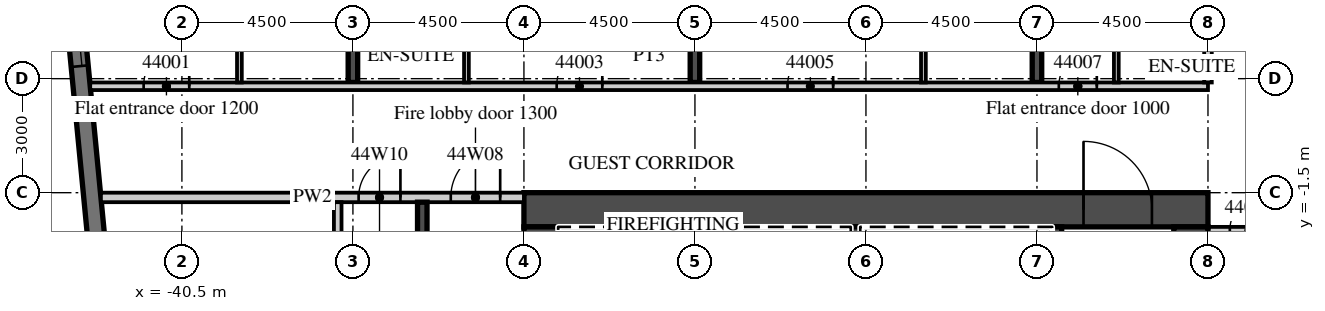
"""IFC4 building model, lengths in metres.
Left out: names, types, materials, properties, quantities, classifications, styles, units other than length and angle.
Written with IfcOpenShell. Run it as: python <this file> out.ifc"""

import sys

from ifc_helpers import new_model, si_unit, direction, frame, frame_2d, origin, place, context, subcontext, project, spatial, rectangle, extrude, element, fill, save


model = new_model("IFC4")
c1 = context("Model", 3, precision=1e-05, world=origin(), true_north=direction((0.0, 1.0)))
c2 = subcontext(c1, "Body", "Model", "MODEL_VIEW")
j1 = project(units=[si_unit("LENGTHUNIT", "METRE"), si_unit("PLANEANGLEUNIT", "RADIAN")], contexts=[c1])
p1 = place(None, origin())
s1 = spatial("IfcSite", under=j1, at=p1, CompositionType="ELEMENT")
p2 = place(p1, origin())
s2 = spatial("IfcBuilding", under=s1, at=p2, CompositionType="ELEMENT")
p3 = place(p2, frame((0.0, 0.0, 186.7)))
s3 = spatial("IfcBuildingStorey", under=s2, at=p3, CompositionType="ELEMENT", Elevation=186.7)
p4 = place(p3, frame((-36.0, 1.4, 0.0), z_axis=(0.0, 0.0, 1.0), x_axis=(0.0, 1.0, 0.0)))
e1 = element("IfcWall", 1, at=p4, inside=s3, PredefinedType="SHEAR", context=c2, shape_type="SweptSolid", body=[
    extrude(rectangle(XDim=15.401, YDim=0.25, at=frame_2d((7.701, 0.0))), origin(), (0.0, 0.0, 1.0), 3.3),
])
p5 = place(p3, frame((-27.0, 1.4, 0.0), z_axis=(0.0, 0.0, 1.0), x_axis=(0.0, 1.0, 0.0)))
e2 = element("IfcWall", 2, at=p5, inside=s3, PredefinedType="SHEAR", context=c2, shape_type="SweptSolid", body=[
    extrude(rectangle(XDim=16.268, YDim=0.25, at=frame_2d((8.134, 0.0))), origin(), (0.0, 0.0, 1.0), 3.3),
])
p6 = place(p3, frame((-18.0, 1.4, 0.0), z_axis=(0.0, 0.0, 1.0), x_axis=(0.0, 1.0, 0.0)))
e3 = element("IfcWall", 3, at=p6, inside=s3, PredefinedType="SHEAR", context=c2, shape_type="SweptSolid", body=[
    extrude(rectangle(XDim=17.134, YDim=0.25, at=frame_2d((8.567, 0.0))), origin(), (0.0, 0.0, 1.0), 3.3),
])
p7 = place(p3, frame((-44.214, 12.466, 0.0), z_axis=(0.0, 0.0, 1.0), x_axis=(0.095847314626, -0.995396047952, 0.0)))
e4 = element("IfcWall", 4, at=p7, inside=s3, PredefinedType="SOLIDWALL", context=c2, shape_type="SweptSolid", body=[
    extrude(rectangle(XDim=34.0, YDim=0.45, at=frame_2d((17.0, 0.0))), origin(), (0.0, 0.0, 1.0), 3.02),
])
p8 = place(p7, frame((2.865, 0.0, 0.45)))
e5 = element("IfcOpeningElement", 5, at=p8, cuts=e4, PredefinedType="OPENING", context=c2, shape_type="SweptSolid", body=[
    extrude(rectangle(XDim=3.3, YDim=2.25, at=frame_2d((1.65, 1.125))), frame((0.0, 0.235, 0.0), z_axis=(0.0, -1.0, 0.0), x_axis=(1.0, 0.0, 0.0)), (0.0, 0.0, 1.0), 0.47),
])
p9 = place(p7, frame((7.386, 0.0, 0.45)))
e6 = element("IfcOpeningElement", 6, at=p9, cuts=e4, PredefinedType="OPENING", context=c2, shape_type="SweptSolid", body=[
    extrude(rectangle(XDim=3.3, YDim=2.25, at=frame_2d((1.65, 1.125))), frame((0.0, 0.235, 0.0), z_axis=(0.0, -1.0, 0.0), x_axis=(1.0, 0.0, 0.0)), (0.0, 0.0, 1.0), 0.47),
])
p10 = place(p3, frame((-42.913, 1.3, 0.0), z_axis=(0.0, 0.0, 1.0), x_axis=(1.0, 0.0, 0.0)))
e7 = element("IfcWall", 7, at=p10, inside=s3, PredefinedType="PARTITIONING", context=c2, shape_type="SweptSolid", body=[
    extrude(rectangle(XDim=29.413, YDim=0.2, at=frame_2d((14.707, 0.0))), origin(), (0.0, 0.0, 1.0), 3.02),
])
p11 = place(p10, frame((1.406, 0.0, 0.0)))
e8 = element("IfcOpeningElement", 8, at=p11, cuts=e7, PredefinedType="OPENING", context=c2, shape_type="SweptSolid", body=[
    extrude(rectangle(XDim=1.2, YDim=2.1, at=frame_2d((0.6, 1.05))), frame((0.0, 0.11, 0.0), z_axis=(0.0, -1.0, 0.0), x_axis=(1.0, 0.0, 0.0)), (0.0, 0.0, 1.0), 0.22),
])
p12 = place(p10, frame((12.275, 0.0, 0.0)))
e9 = element("IfcOpeningElement", 9, at=p12, cuts=e7, PredefinedType="OPENING", context=c2, shape_type="SweptSolid", body=[
    extrude(rectangle(XDim=1.2, YDim=2.1, at=frame_2d((0.6, 1.05))), frame((0.0, 0.11, 0.0), z_axis=(0.0, -1.0, 0.0), x_axis=(1.0, 0.0, 0.0)), (0.0, 0.0, 1.0), 0.22),
])
p13 = place(p10, frame((18.35, 0.0, 0.0)))
e10 = element("IfcOpeningElement", 10, at=p13, cuts=e7, PredefinedType="OPENING", context=c2, shape_type="SweptSolid", body=[
    extrude(rectangle(XDim=1.2, YDim=2.1, at=frame_2d((0.6, 1.05))), frame((0.0, 0.11, 0.0), z_axis=(0.0, -1.0, 0.0), x_axis=(1.0, 0.0, 0.0)), (0.0, 0.0, 1.0), 0.22),
])
p14 = place(p10, frame((25.488, 0.0, 0.0)))
e11 = element("IfcOpeningElement", 11, at=p14, cuts=e7, PredefinedType="OPENING", context=c2, shape_type="SweptSolid", body=[
    extrude(rectangle(XDim=1.0, YDim=2.1, at=frame_2d((0.5, 1.05))), frame((0.0, 0.11, 0.0), z_axis=(0.0, -1.0, 0.0), x_axis=(1.0, 0.0, 0.0)), (0.0, 0.0, 1.0), 0.22),
])
p15 = place(p3, frame((-38.987, 1.4, 0.0), z_axis=(0.0, 0.0, 1.0), x_axis=(0.0, 1.0, 0.0)))
e12 = element("IfcWall", 12, at=p15, inside=s3, PredefinedType="PARTITIONING", context=c2, shape_type="SweptSolid", body=[
    extrude(rectangle(XDim=3.725, YDim=0.125, at=frame_2d((1.863, 0.0))), origin(), (0.0, 0.0, 1.0), 3.02),
])
p16 = place(p15, frame((2.45, 0.0, 0.0)))
e13 = element("IfcOpeningElement", 13, at=p16, cuts=e12, PredefinedType="OPENING", context=c2, shape_type="SweptSolid", body=[
    extrude(rectangle(XDim=0.9, YDim=2.1, at=frame_2d((0.45, 1.05))), frame((0.0, 0.073, 0.0), z_axis=(0.0, -1.0, 0.0), x_axis=(1.0, 0.0, 0.0)), (0.0, 0.0, 1.0), 0.145),
])
p17 = place(p3, frame((-33.013, 1.4, 0.0), z_axis=(0.0, 0.0, 1.0), x_axis=(0.0, 1.0, 0.0)))
e14 = element("IfcWall", 14, at=p17, inside=s3, PredefinedType="PARTITIONING", context=c2, shape_type="SweptSolid", body=[
    extrude(rectangle(XDim=3.725, YDim=0.125, at=frame_2d((1.863, 0.0))), origin(), (0.0, 0.0, 1.0), 3.02),
])
p18 = place(p17, frame((2.45, 0.0, 0.0)))
e15 = element("IfcOpeningElement", 15, at=p18, cuts=e14, PredefinedType="OPENING", context=c2, shape_type="SweptSolid", body=[
    extrude(rectangle(XDim=0.9, YDim=2.1, at=frame_2d((0.45, 1.05))), frame((0.0, 0.073, 0.0), z_axis=(0.0, -1.0, 0.0), x_axis=(1.0, 0.0, 0.0)), (0.0, 0.0, 1.0), 0.145),
])
p19 = place(p3, frame((-20.988, 1.4, 0.0), z_axis=(0.0, 0.0, 1.0), x_axis=(0.0, 1.0, 0.0)))
e16 = element("IfcWall", 16, at=p19, inside=s3, PredefinedType="PARTITIONING", context=c2, shape_type="SweptSolid", body=[
    extrude(rectangle(XDim=3.725, YDim=0.125, at=frame_2d((1.863, 0.0))), origin(), (0.0, 0.0, 1.0), 3.02),
])
p20 = place(p19, frame((2.45, 0.0, 0.0)))
e17 = element("IfcOpeningElement", 17, at=p20, cuts=e16, PredefinedType="OPENING", context=c2, shape_type="SweptSolid", body=[
    extrude(rectangle(XDim=0.9, YDim=2.1, at=frame_2d((0.45, 1.05))), frame((0.0, 0.073, 0.0), z_axis=(0.0, -1.0, 0.0), x_axis=(1.0, 0.0, 0.0)), (0.0, 0.0, 1.0), 0.145),
])
p21 = place(p3, frame((-13.5, 1.4, 0.0), z_axis=(0.0, 0.0, 1.0), x_axis=(0.0, 1.0, 0.0)))
e18 = element("IfcWall", 18, at=p21, inside=s3, PredefinedType="PARTITIONING", context=c2, shape_type="SweptSolid", body=[
    extrude(rectangle(XDim=17.59, YDim=0.2, at=frame_2d((8.795, 0.0))), origin(), (0.0, 0.0, 1.0), 3.02),
])
p22 = place(p3, frame((-15.912, 1.4, 0.0), z_axis=(0.0, 0.0, 1.0), x_axis=(0.0, 1.0, 0.0)))
e19 = element("IfcWall", 19, at=p22, inside=s3, PredefinedType="PARTITIONING", context=c2, shape_type="SweptSolid", body=[
    extrude(rectangle(XDim=3.725, YDim=0.125, at=frame_2d((1.863, 0.0))), origin(), (0.0, 0.0, 1.0), 3.02),
])
p23 = place(p22, frame((2.45, 0.0, 0.0)))
e20 = element("IfcOpeningElement", 20, at=p23, cuts=e19, PredefinedType="OPENING", context=c2, shape_type="SweptSolid", body=[
    extrude(rectangle(XDim=0.9, YDim=2.1, at=frame_2d((0.45, 1.05))), frame((0.0, 0.073, 0.0), z_axis=(0.0, -1.0, 0.0), x_axis=(1.0, 0.0, 0.0)), (0.0, 0.0, 1.0), 0.145),
])
p24 = place(p3, frame((-13.5, -2.5, 0.0), z_axis=(0.0, 0.0, 1.0), x_axis=(1.0, 0.0, 0.0)))
e21 = element("IfcWall", 21, at=p24, inside=s3, PredefinedType="PARTITIONING", context=c2, shape_type="SweptSolid", body=[
    extrude(rectangle(XDim=27.0, YDim=0.2, at=frame_2d((13.5, 0.0))), origin(), (0.0, 0.0, 1.0), 3.02),
])
p25 = place(p24, frame((0.575, 0.0, 0.0)))
e22 = element("IfcOpeningElement", 22, at=p25, cuts=e21, PredefinedType="OPENING", context=c2, shape_type="SweptSolid", body=[
    extrude(rectangle(XDim=1.0, YDim=2.1, at=frame_2d((0.5, 1.05))), frame((0.0, 0.11, 0.0), z_axis=(0.0, -1.0, 0.0), x_axis=(1.0, 0.0, 0.0)), (0.0, 0.0, 1.0), 0.22),
])
p26 = place(p24, frame((7.45, 0.0, 0.0)))
e23 = element("IfcOpeningElement", 23, at=p26, cuts=e21, PredefinedType="OPENING", context=c2, shape_type="SweptSolid", body=[
    extrude(rectangle(XDim=1.0, YDim=2.1, at=frame_2d((0.5, 1.05))), frame((0.0, 0.11, 0.0), z_axis=(0.0, -1.0, 0.0), x_axis=(1.0, 0.0, 0.0)), (0.0, 0.0, 1.0), 0.22),
])
p27 = place(p24, frame((9.55, 0.0, 0.0)))
e24 = element("IfcOpeningElement", 24, at=p27, cuts=e21, PredefinedType="OPENING", context=c2, shape_type="SweptSolid", body=[
    extrude(rectangle(XDim=1.0, YDim=2.1, at=frame_2d((0.5, 1.05))), frame((0.0, 0.11, 0.0), z_axis=(0.0, -1.0, 0.0), x_axis=(1.0, 0.0, 0.0)), (0.0, 0.0, 1.0), 0.22),
])
p28 = place(p24, frame((18.862, 0.0, 0.0)))
e25 = element("IfcOpeningElement", 25, at=p28, cuts=e21, PredefinedType="OPENING", context=c2, shape_type="SweptSolid", body=[
    extrude(rectangle(XDim=1.2, YDim=2.1, at=frame_2d((0.6, 1.05))), frame((0.0, 0.11, 0.0), z_axis=(0.0, -1.0, 0.0), x_axis=(1.0, 0.0, 0.0)), (0.0, 0.0, 1.0), 0.22),
])
p29 = place(p24, frame((23.075, 0.0, 0.0)))
e26 = element("IfcOpeningElement", 26, at=p29, cuts=e21, PredefinedType="OPENING", context=c2, shape_type="SweptSolid", body=[
    extrude(rectangle(XDim=1.0, YDim=2.1, at=frame_2d((0.5, 1.05))), frame((0.0, 0.11, 0.0), z_axis=(0.0, -1.0, 0.0), x_axis=(1.0, 0.0, 0.0)), (0.0, 0.0, 1.0), 0.22),
])
p30 = place(p3, frame((-31.5, -1.95, 0.0), z_axis=(0.0, 0.0, 1.0), x_axis=(1.0, 0.0, 0.0)))
e27 = element("IfcWall", 27, at=p30, inside=s3, PredefinedType="SHEAR", context=c2, shape_type="SweptSolid", body=[
    extrude(rectangle(XDim=18.0, YDim=0.9, at=frame_2d((9.0, 0.0))), origin(), (0.0, 0.0, 1.0), 3.02),
])
p31 = place(p30, frame((14.725, 0.0, 0.0)))
e28 = element("IfcOpeningElement", 28, at=p31, cuts=e27, PredefinedType="OPENING", context=c2, shape_type="SweptSolid", body=[
    extrude(rectangle(XDim=1.8, YDim=2.1, at=frame_2d((0.9, 1.05))), frame((0.0, 0.46, 0.0), z_axis=(0.0, -1.0, 0.0), x_axis=(1.0, 0.0, 0.0)), (0.0, 0.0, 1.0), 0.92),
])
p32 = place(p3, frame((-31.05, -15.2, 0.0), z_axis=(0.0, 0.0, 1.0), x_axis=(0.0, 1.0, 0.0)))
e29 = element("IfcWall", 29, at=p32, inside=s3, PredefinedType="SHEAR", context=c2, shape_type="SweptSolid", body=[
    extrude(rectangle(XDim=12.8, YDim=0.9, at=frame_2d((6.4, 0.0))), origin(), (0.0, 0.0, 1.0), 3.02),
])
p33 = place(p32, frame((11.5, 0.0, 0.0)))
e30 = element("IfcOpeningElement", 30, at=p33, cuts=e29, PredefinedType="OPENING", context=c2, shape_type="SweptSolid", body=[
    extrude(rectangle(XDim=1.1, YDim=2.1, at=frame_2d((0.55, 1.05))), frame((0.0, 0.46, 0.0), z_axis=(0.0, -1.0, 0.0), x_axis=(1.0, 0.0, 0.0)), (0.0, 0.0, 1.0), 0.92),
])
p34 = place(p3, frame((-13.95, -14.6, 0.0), z_axis=(0.0, 0.0, 1.0), x_axis=(0.0, 1.0, 0.0)))
e31 = element("IfcWall", 31, at=p34, inside=s3, PredefinedType="SHEAR", context=c2, shape_type="SweptSolid", body=[
    extrude(rectangle(XDim=12.2, YDim=0.9, at=frame_2d((6.1, 0.0))), origin(), (0.0, 0.0, 1.0), 3.02),
])
p35 = place(p3, frame((-17.475, -5.55, 0.0), z_axis=(0.0, 0.0, 1.0), x_axis=(0.0, 1.0, 0.0)))
e32 = element("IfcWall", 32, at=p35, inside=s3, PredefinedType="SHEAR", context=c2, shape_type="SweptSolid", body=[
    extrude(rectangle(XDim=3.15, YDim=0.25, at=frame_2d((1.575, 0.0))), origin(), (0.0, 0.0, 1.0), 3.02),
])
for number, where, z_axis, x_axis in (
    (33, (-27.975, -5.3, 0.0), (0.0, 0.0, 1.0), (0.0, 1.0, 0.0)),
    (34, (-22.775, -5.3, 0.0), (0.0, 0.0, 1.0), (0.0, 1.0, 0.0)),
):
    element("IfcWall", number, at=place(p3, frame(where, z_axis=z_axis, x_axis=x_axis)), inside=s3, PredefinedType="SHEAR", context=c2, shape_type="SweptSolid", body=[
        extrude(rectangle(XDim=2.9, YDim=0.25, at=frame_2d((1.45, 0.0))), origin(), (0.0, 0.0, 1.0), 3.02),
    ])
p36 = place(p3, frame((-42.632, -1.625, 0.0), z_axis=(0.0, 0.0, 1.0), x_axis=(1.0, 0.0, 0.0)))
e35 = element("IfcWall", 35, at=p36, inside=s3, PredefinedType="PARTITIONING", context=c2, shape_type="SweptSolid", body=[
    extrude(rectangle(XDim=11.132, YDim=0.25, at=frame_2d((5.566, 0.0))), origin(), (0.0, 0.0, 1.0), 3.02),
])
p37 = place(p36, frame((9.207, 0.0, 0.0)))
e36 = element("IfcOpeningElement", 36, at=p37, cuts=e35, PredefinedType="OPENING", context=c2, shape_type="SweptSolid", body=[
    extrude(rectangle(XDim=1.3, YDim=2.1, at=frame_2d((0.65, 1.05))), frame((0.0, 0.135, 0.0), z_axis=(0.0, -1.0, 0.0), x_axis=(1.0, 0.0, 0.0)), (0.0, 0.0, 1.0), 0.27),
])
p38 = place(p36, frame((6.781, 0.0, 0.0)))
e37 = element("IfcOpeningElement", 37, at=p38, cuts=e35, PredefinedType="OPENING", context=c2, shape_type="SweptSolid", body=[
    extrude(rectangle(XDim=1.1, YDim=2.1, at=frame_2d((0.55, 1.05))), frame((0.0, 0.135, 0.0), z_axis=(0.0, -1.0, 0.0), x_axis=(1.0, 0.0, 0.0)), (0.0, 0.0, 1.0), 0.27),
])
p39 = place(p3, frame((-34.175, -10.1, 0.0), z_axis=(0.0, 0.0, 1.0), x_axis=(0.0, 1.0, 0.0)))
e38 = element("IfcWall", 38, at=p39, inside=s3, PredefinedType="SHEAR", context=c2, shape_type="SweptSolid", body=[
    extrude(rectangle(XDim=8.35, YDim=0.25, at=frame_2d((4.175, 0.0))), origin(), (0.0, 0.0, 1.0), 3.02),
])
p40 = place(p3, frame((-36.4, -17.7, 0.0), z_axis=(0.0, 0.0, 1.0), x_axis=(0.0, 1.0, 0.0)))
e39 = element("IfcWall", 39, at=p40, inside=s3, PredefinedType="PARTITIONING", context=c2, shape_type="SweptSolid", body=[
    extrude(rectangle(XDim=15.95, YDim=0.2, at=frame_2d((7.975, 0.0))), origin(), (0.0, 0.0, 1.0), 3.02),
])
p41 = place(p40, frame((0.35, 0.0, 0.0)))
e40 = element("IfcOpeningElement", 40, at=p41, cuts=e39, PredefinedType="OPENING", context=c2, shape_type="SweptSolid", body=[
    extrude(rectangle(XDim=0.9, YDim=2.1, at=frame_2d((0.45, 1.05))), frame((0.0, 0.11, 0.0), z_axis=(0.0, -1.0, 0.0), x_axis=(1.0, 0.0, 0.0)), (0.0, 0.0, 1.0), 0.22),
])
p42 = place(p9, origin())
e41 = element("IfcWindow", 41, at=p42, inside=s3, PartitioningType="SINGLE_PANEL", PredefinedType="WINDOW", context=c2, shape_type="SweptSolid", body=[
    extrude(rectangle(XDim=3.3, YDim=2.25, at=frame_2d((1.65, 1.125))), frame((0.0, 0.09, 0.0), z_axis=(0.0, -1.0, 0.0), x_axis=(1.0, 0.0, 0.0)), (0.0, 0.0, 1.0), 0.06),
])
fill(e6, e41)
p43 = place(p11, origin())
e42 = element("IfcDoor", 42, at=p43, inside=s3, OperationType="SINGLE_SWING_RIGHT", PredefinedType="DOOR", context=c2, shape_type="SweptSolid", body=[
    extrude(rectangle(XDim=1.2, YDim=2.1, at=frame_2d((0.6, 1.05))), frame((0.0, 0.025, 0.0), z_axis=(0.0, -1.0, 0.0), x_axis=(1.0, 0.0, 0.0)), (0.0, 0.0, 1.0), 0.05),
])
fill(e8, e42)
p44 = place(p12, origin())
e43 = element("IfcDoor", 43, at=p44, inside=s3, OperationType="SINGLE_SWING_RIGHT", PredefinedType="DOOR", context=c2, shape_type="SweptSolid", body=[
    extrude(rectangle(XDim=1.2, YDim=2.1, at=frame_2d((0.6, 1.05))), frame((0.0, 0.025, 0.0), z_axis=(0.0, -1.0, 0.0), x_axis=(1.0, 0.0, 0.0)), (0.0, 0.0, 1.0), 0.05),
])
fill(e9, e43)
p45 = place(p13, origin())
e44 = element("IfcDoor", 44, at=p45, inside=s3, OperationType="SINGLE_SWING_RIGHT", PredefinedType="DOOR", context=c2, shape_type="SweptSolid", body=[
    extrude(rectangle(XDim=1.2, YDim=2.1, at=frame_2d((0.6, 1.05))), frame((0.0, 0.025, 0.0), z_axis=(0.0, -1.0, 0.0), x_axis=(1.0, 0.0, 0.0)), (0.0, 0.0, 1.0), 0.05),
])
fill(e10, e44)
p46 = place(p14, origin())
e45 = element("IfcDoor", 45, at=p46, inside=s3, OperationType="SINGLE_SWING_RIGHT", PredefinedType="DOOR", context=c2, shape_type="SweptSolid", body=[
    extrude(rectangle(XDim=1.0, YDim=2.1, at=frame_2d((0.5, 1.05))), frame((0.0, 0.025, 0.0), z_axis=(0.0, -1.0, 0.0), x_axis=(1.0, 0.0, 0.0)), (0.0, 0.0, 1.0), 0.05),
])
fill(e11, e45)
p47 = place(p25, origin())
e46 = element("IfcDoor", 46, at=p47, inside=s3, OperationType="SINGLE_SWING_RIGHT", PredefinedType="DOOR", context=c2, shape_type="SweptSolid", body=[
    extrude(rectangle(XDim=1.0, YDim=2.1, at=frame_2d((0.5, 1.05))), frame((0.0, 0.025, 0.0), z_axis=(0.0, -1.0, 0.0), x_axis=(1.0, 0.0, 0.0)), (0.0, 0.0, 1.0), 0.05),
])
fill(e22, e46)
p48 = place(p31, origin())
e47 = element("IfcDoor", 47, at=p48, inside=s3, OperationType="DOUBLE_DOOR_DOUBLE_SWING", PredefinedType="DOOR", context=c2, shape_type="SweptSolid", body=[
    extrude(rectangle(XDim=1.8, YDim=2.1, at=frame_2d((0.9, 1.05))), frame((0.0, 0.025, 0.0), z_axis=(0.0, -1.0, 0.0), x_axis=(1.0, 0.0, 0.0)), (0.0, 0.0, 1.0), 0.05),
])
fill(e28, e47)
p49 = place(p37, origin())
e48 = element("IfcDoor", 48, at=p49, inside=s3, OperationType="SINGLE_SWING_RIGHT", PredefinedType="DOOR", context=c2, shape_type="SweptSolid", body=[
    extrude(rectangle(XDim=1.3, YDim=2.1, at=frame_2d((0.65, 1.05))), frame((0.0, 0.025, 0.0), z_axis=(0.0, -1.0, 0.0), x_axis=(1.0, 0.0, 0.0)), (0.0, 0.0, 1.0), 0.05),
])
fill(e36, e48)
p50 = place(p38, origin())
e49 = element("IfcDoor", 49, at=p50, inside=s3, OperationType="SINGLE_SWING_RIGHT", PredefinedType="DOOR", context=c2, shape_type="SweptSolid", body=[
    extrude(rectangle(XDim=1.1, YDim=2.1, at=frame_2d((0.55, 1.05))), frame((0.0, 0.025, 0.0), z_axis=(0.0, -1.0, 0.0), x_axis=(1.0, 0.0, 0.0)), (0.0, 0.0, 1.0), 0.05),
])
fill(e37, e49)
save(model, sys.argv[1])
